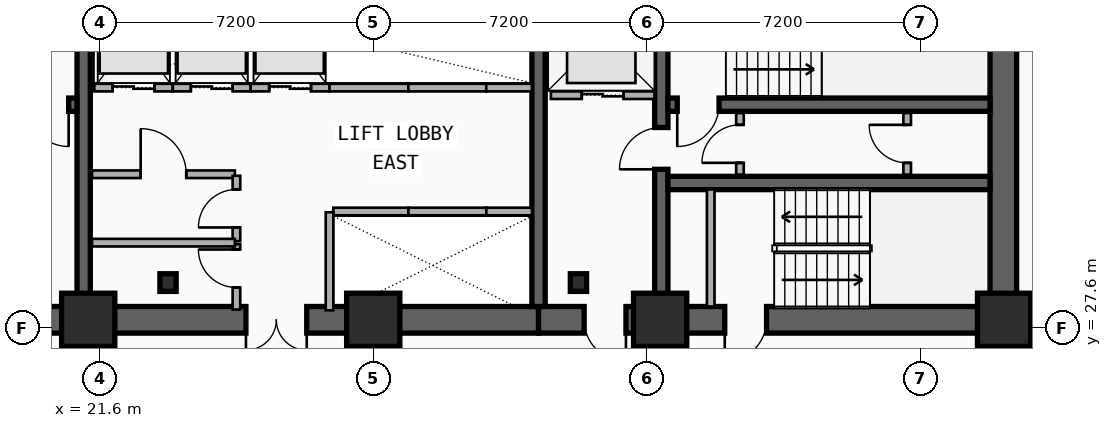
"""IFC4 building model, lengths in metres.
Left out: names, types, materials, properties, quantities, classifications, styles, units other than length and angle.
Written with IfcOpenShell. Run it as: python <this file> out.ifc"""

import sys

from ifc_helpers import new_model, si_unit, direction, frame, frame_2d, origin, origin_2d, place, context, subcontext, project, spatial, rectangle, i_section, extrude, element, fill, save


model = new_model("IFC4")
c1 = context("Model", 3, precision=1e-05, world=origin(), true_north=direction((0.0, 1.0)))
c2 = subcontext(c1, "Body", "Model", "MODEL_VIEW")
j1 = project(units=[si_unit("LENGTHUNIT", "METRE"), si_unit("PLANEANGLEUNIT", "RADIAN")], contexts=[c1])
p1 = place(None, origin())
s1 = spatial("IfcSite", under=j1, at=p1, CompositionType="ELEMENT")
p2 = place(p1, origin())
s2 = spatial("IfcBuilding", under=s1, at=p2, CompositionType="ELEMENT")
p3 = place(p2, frame((0.0, 0.0, 36.0)))
s3 = spatial("IfcBuildingStorey", under=s2, at=p3, CompositionType="ELEMENT", Elevation=36.0)
p4 = place(p3, frame((21.18, 27.82, 0.0), z_axis=(0.0, 0.0, 1.0), x_axis=(-1.0, 0.0, 0.0)))
e1 = element("IfcWall", 1, at=p4, inside=s3, PredefinedType="SHEAR", context=c2, shape_type="SweptSolid", body=[
    extrude(rectangle(XDim=9.03, YDim=0.7, at=frame_2d((4.515, 0.0))), origin(), (0.0, 0.0, 1.0), 3.5),
])
p5 = place(p4, frame((2.68, 0.0, 0.0)))
e2 = element("IfcOpeningElement", 2, at=p5, cuts=e1, PredefinedType="OPENING", context=c2, shape_type="SweptSolid", body=[
    extrude(rectangle(XDim=1.1, YDim=2.15, at=frame_2d((0.55, 1.075))), frame((0.0, 0.36, 0.0), z_axis=(0.0, -1.0, 0.0), x_axis=(1.0, 0.0, 0.0)), (0.0, 0.0, 1.0), 0.72),
])
p6 = place(p3, frame((33.15, 27.82, 0.0), z_axis=(0.0, 0.0, 1.0), x_axis=(-1.0, 0.0, 0.0)))
e3 = element("IfcWall", 3, at=p6, inside=s3, PredefinedType="SHEAR", context=c2, shape_type="SweptSolid", body=[
    extrude(rectangle(XDim=11.97, YDim=0.7, at=frame_2d((5.985, 0.0))), origin(), (0.0, 0.0, 1.0), 3.5),
])
p7 = place(p6, frame((6.1, 0.0, 0.0)))
e4 = element("IfcOpeningElement", 4, at=p7, cuts=e3, PredefinedType="OPENING", context=c2, shape_type="SweptSolid", body=[
    extrude(rectangle(XDim=1.6, YDim=2.2, at=frame_2d((0.8, 1.1))), frame((0.0, 0.36, 0.0), z_axis=(0.0, -1.0, 0.0), x_axis=(1.0, 0.0, 0.0)), (0.0, 0.0, 1.0), 0.72),
])
p8 = place(p3, frame((45.38, 27.82, 0.0), z_axis=(0.0, 0.0, 1.0), x_axis=(-1.0, 0.0, 0.0)))
e5 = element("IfcWall", 5, at=p8, inside=s3, PredefinedType="SHEAR", context=c2, shape_type="SweptSolid", body=[
    extrude(rectangle(XDim=12.23, YDim=0.7, at=frame_2d((6.115, 0.0))), origin(), (0.0, 0.0, 1.0), 3.5),
])
p9 = place(p8, frame((9.93, 0.0, 0.0)))
e6 = element("IfcOpeningElement", 6, at=p9, cuts=e5, PredefinedType="OPENING", context=c2, shape_type="SweptSolid", body=[
    extrude(rectangle(XDim=1.1, YDim=2.15, at=frame_2d((0.55, 1.075))), frame((0.0, 0.36, 0.0), z_axis=(0.0, -1.0, 0.0), x_axis=(1.0, 0.0, 0.0)), (0.0, 0.0, 1.0), 0.72),
])
p10 = place(p8, frame((6.23, 0.0, 0.0)))
e7 = element("IfcOpeningElement", 7, at=p10, cuts=e5, PredefinedType="OPENING", context=c2, shape_type="SweptSolid", body=[
    extrude(rectangle(XDim=1.1, YDim=2.15, at=frame_2d((0.55, 1.075))), frame((0.0, 0.36, 0.0), z_axis=(0.0, -1.0, 0.0), x_axis=(1.0, 0.0, 0.0)), (0.0, 0.0, 1.0), 0.72),
])
p11 = place(p3, frame((45.38, 28.17, 0.0), z_axis=(0.0, 0.0, 1.0), x_axis=(0.0, 1.0, 0.0)))
e8 = element("IfcWall", 8, at=p11, inside=s3, PredefinedType="SHEAR", context=c2, shape_type="SweptSolid", body=[
    extrude(rectangle(XDim=8.53, YDim=0.7, at=frame_2d((4.265, 0.0))), origin(), (0.0, 0.0, 1.0), 3.5),
])
for number, where, z_axis, x_axis in (
    (9, (21.18, 28.17, 0.0), (0.0, 0.0, 1.0), (0.0, 1.0, 0.0)),
    (10, (33.15, 28.17, 0.0), (0.0, 0.0, 1.0), (0.0, 1.0, 0.0)),
):
    element("IfcWall", number, at=place(p3, frame(where, z_axis=z_axis, x_axis=x_axis)), inside=s3, PredefinedType="SHEAR", context=c2, shape_type="SweptSolid", body=[
        extrude(rectangle(XDim=8.53, YDim=0.35, at=frame_2d((4.265, 0.0))), origin(), (0.0, 0.0, 1.0), 3.5),
    ])
p12 = place(p3, frame((36.38, 28.17, 0.0), z_axis=(0.0, 0.0, 1.0), x_axis=(0.0, 1.0, 0.0)))
e11 = element("IfcWall", 11, at=p12, inside=s3, PredefinedType="SHEAR", context=c2, shape_type="SweptSolid", body=[
    extrude(rectangle(XDim=8.53, YDim=0.35, at=frame_2d((4.265, 0.0))), origin(), (0.0, 0.0, 1.0), 3.5),
])
p13 = place(p12, frame((3.61, 0.0, 0.0)))
e12 = element("IfcOpeningElement", 12, at=p13, cuts=e11, PredefinedType="OPENING", context=c2, shape_type="SweptSolid", body=[
    extrude(rectangle(XDim=1.1, YDim=2.15, at=frame_2d((0.55, 1.075))), frame((0.0, 0.185, 0.0), z_axis=(0.0, -1.0, 0.0), x_axis=(1.0, 0.0, 0.0)), (0.0, 0.0, 1.0), 0.37),
])
p14 = place(p3, frame((21.005, 33.48, 0.0), z_axis=(0.0, 0.0, 1.0), x_axis=(-1.0, 0.0, 0.0)))
e13 = element("IfcWall", 13, at=p14, inside=s3, PredefinedType="SHEAR", context=c2, shape_type="SweptSolid", body=[
    extrude(rectangle(XDim=8.505, YDim=0.35, at=frame_2d((4.252, 0.0))), origin(), (0.0, 0.0, 1.0), 3.5),
])
p15 = place(p14, frame((0.22, 0.0, 0.0)))
e14 = element("IfcOpeningElement", 14, at=p15, cuts=e13, PredefinedType="OPENING", context=c2, shape_type="SweptSolid", body=[
    extrude(rectangle(XDim=1.1, YDim=2.15, at=frame_2d((0.55, 1.075))), frame((0.0, 0.185, 0.0), z_axis=(0.0, -1.0, 0.0), x_axis=(1.0, 0.0, 0.0)), (0.0, 0.0, 1.0), 0.37),
])
p16 = place(p3, frame((45.03, 33.48, 0.0), z_axis=(0.0, 0.0, 1.0), x_axis=(-1.0, 0.0, 0.0)))
e15 = element("IfcWall", 15, at=p16, inside=s3, PredefinedType="SHEAR", context=c2, shape_type="SweptSolid", body=[
    extrude(rectangle(XDim=8.475, YDim=0.35, at=frame_2d((4.238, 0.0))), origin(), (0.0, 0.0, 1.0), 3.5),
])
p17 = place(p16, frame((7.13, 0.0, 0.0)))
e16 = element("IfcOpeningElement", 16, at=p17, cuts=e15, PredefinedType="OPENING", context=c2, shape_type="SweptSolid", body=[
    extrude(rectangle(XDim=1.1, YDim=2.15, at=frame_2d((0.55, 1.075))), frame((0.0, 0.185, 0.0), z_axis=(0.0, -1.0, 0.0), x_axis=(1.0, 0.0, 0.0)), (0.0, 0.0, 1.0), 0.37),
])
p18 = place(p3, frame((36.555, 31.42, 0.0), z_axis=(0.0, 0.0, 1.0), x_axis=(1.0, 0.0, 0.0)))
e17 = element("IfcWall", 17, at=p18, inside=s3, PredefinedType="SHEAR", context=c2, shape_type="SweptSolid", body=[
    extrude(rectangle(XDim=8.475, YDim=0.35, at=frame_2d((4.238, 0.0))), origin(), (0.0, 0.0, 1.0), 3.5),
])
for number, where, z_axis, x_axis in (
    (18, (23.4, 28.8, 0.0), (0.0, 0.0, 1.0), (1.0, 0.0, 0.0)),
    (19, (34.2, 28.8, 0.0), (0.0, 0.0, 1.0), (1.0, 0.0, 0.0)),
):
    element("IfcColumn", number, at=place(p3, frame(where, z_axis=z_axis, x_axis=x_axis)), inside=s3, PredefinedType="COLUMN", context=c2, shape_type="SweptSolid", body=[
        extrude(i_section(OverallWidth=0.428, OverallDepth=0.465, WebThickness=0.045, FlangeThickness=0.073, FilletRadius=0.015, at=origin_2d()), origin(), (0.0, 0.0, 1.0), 3.5),
    ])
for number, where, z_axis, x_axis in (
    (20, (21.3, 27.82, 0.0), (0.0, 0.0, 1.0), (1.0, 0.0, 0.0)),
    (21, (28.8, 27.82, 0.0), (0.0, 0.0, 1.0), (1.0, 0.0, 0.0)),
    (22, (36.35, 27.82, 0.0), (0.0, 0.0, 1.0), (1.0, 0.0, 0.0)),
    (23, (45.4, 27.82, 0.0), (0.0, 0.0, 1.0), (1.0, 0.0, 0.0)),
):
    element("IfcColumn", number, at=place(p3, frame(where, z_axis=z_axis, x_axis=x_axis)), inside=s3, PredefinedType="COLUMN", context=c2, shape_type="SweptSolid", body=[
        extrude(rectangle(XDim=1.4, YDim=1.4, at=origin_2d()), origin(), (0.0, 0.0, 1.0), 3.5),
    ])
p19 = place(p3, frame((33.475, 33.73, 0.0), z_axis=(0.0, 0.0, 1.0), x_axis=(1.0, 0.0, 0.0)))
e24 = element("IfcWall", 24, at=p19, inside=s3, PredefinedType="PARTITIONING", context=c2, shape_type="SweptSolid", body=[
    extrude(rectangle(XDim=2.725, YDim=0.2, at=frame_2d((1.362, 0.0))), origin(), (0.0, 0.0, 1.0), 2.212),
])
p20 = place(p19, frame((0.812, 0.0, 0.0)))
e25 = element("IfcOpeningElement", 25, at=p20, cuts=e24, PredefinedType="OPENING", context=c2, shape_type="SweptSolid", body=[
    extrude(rectangle(XDim=1.1, YDim=2.15, at=frame_2d((0.55, 1.075))), frame((0.0, 0.11, 0.0), z_axis=(0.0, -1.0, 0.0), x_axis=(1.0, 0.0, 0.0)), (0.0, 0.0, 1.0), 0.22),
])
p21 = place(p3, frame((27.75, 30.67, 0.0), z_axis=(0.0, 0.0, 1.0), x_axis=(1.0, 0.0, 0.0)))
e26 = element("IfcWall", 26, at=p21, inside=s3, PredefinedType="PARTITIONING", context=c2, shape_type="SweptSolid", body=[
    extrude(rectangle(XDim=1.975, YDim=0.2, at=frame_2d((0.988, 0.0))), origin(), (0.0, 0.0, 1.0), 2.212),
])
p22 = place(p3, frame((27.65, 28.07, 0.0), z_axis=(0.0, 0.0, 1.0), x_axis=(0.0, 1.0, 0.0)))
e27 = element("IfcWall", 27, at=p22, inside=s3, PredefinedType="PARTITIONING", context=c2, shape_type="SweptSolid", body=[
    extrude(rectangle(XDim=2.58, YDim=0.2, at=frame_2d((1.29, 0.0))), origin(), (0.0, 0.0, 1.0), 2.212),
])
p23 = place(p3, frame((29.725, 30.67, 0.0), z_axis=(0.0, 0.0, 1.0), x_axis=(1.0, 0.0, 0.0)))
e28 = element("IfcWall", 28, at=p23, inside=s3, PredefinedType="PARTITIONING", context=c2, shape_type="SweptSolid", body=[
    extrude(rectangle(XDim=2.05, YDim=0.2, at=frame_2d((1.025, 0.0))), origin(), (0.0, 0.0, 1.0), 2.62),
])
p24 = place(p3, frame((31.775, 30.67, 0.0), z_axis=(0.0, 0.0, 1.0), x_axis=(1.0, 0.0, 0.0)))
e29 = element("IfcWall", 29, at=p24, inside=s3, PredefinedType="PARTITIONING", context=c2, shape_type="SweptSolid", body=[
    extrude(rectangle(XDim=1.2, YDim=0.2, at=frame_2d((0.6, 0.0))), origin(), (0.0, 0.0, 1.0), 2.62),
])
p25 = place(p3, frame((21.46, 33.93, 0.0), z_axis=(0.0, 0.0, 1.0), x_axis=(1.0, 0.0, 0.0)))
e30 = element("IfcWall", 30, at=p25, inside=s3, PredefinedType="PARTITIONING", context=c2, shape_type="SweptSolid", body=[
    extrude(rectangle(XDim=2.065, YDim=0.2, at=frame_2d((1.032, 0.0))), origin(), (0.0, 0.0, 1.0), 2.212),
])
p26 = place(p25, frame((0.482, 0.0, 0.0)))
e31 = element("IfcOpeningElement", 31, at=p26, cuts=e30, PredefinedType="OPENING", context=c2, shape_type="SweptSolid", body=[
    extrude(rectangle(XDim=1.1, YDim=2.15, at=frame_2d((0.55, 1.075))), frame((0.0, 0.11, 0.0), z_axis=(0.0, -1.0, 0.0), x_axis=(1.0, 0.0, 0.0)), (0.0, 0.0, 1.0), 0.22),
])
p27 = place(p3, frame((23.525, 33.93, 0.0), z_axis=(0.0, 0.0, 1.0), x_axis=(1.0, 0.0, 0.0)))
e32 = element("IfcWall", 32, at=p27, inside=s3, PredefinedType="PARTITIONING", context=c2, shape_type="SweptSolid", body=[
    extrude(rectangle(XDim=2.05, YDim=0.2, at=frame_2d((1.025, 0.0))), origin(), (0.0, 0.0, 1.0), 3.24),
])
p28 = place(p27, frame((0.475, 0.0, 0.0)))
e33 = element("IfcOpeningElement", 33, at=p28, cuts=e32, PredefinedType="OPENING", context=c2, shape_type="SweptSolid", body=[
    extrude(rectangle(XDim=1.1, YDim=2.15, at=frame_2d((0.55, 1.075))), frame((0.0, 0.11, 0.0), z_axis=(0.0, -1.0, 0.0), x_axis=(1.0, 0.0, 0.0)), (0.0, 0.0, 1.0), 0.22),
])
p29 = place(p3, frame((25.575, 33.93, 0.0), z_axis=(0.0, 0.0, 1.0), x_axis=(1.0, 0.0, 0.0)))
e34 = element("IfcWall", 34, at=p29, inside=s3, PredefinedType="PARTITIONING", context=c2, shape_type="SweptSolid", body=[
    extrude(rectangle(XDim=2.075, YDim=0.2, at=frame_2d((1.038, 0.0))), origin(), (0.0, 0.0, 1.0), 3.24),
])
p30 = place(p29, frame((0.488, 0.0, 0.0)))
e35 = element("IfcOpeningElement", 35, at=p30, cuts=e34, PredefinedType="OPENING", context=c2, shape_type="SweptSolid", body=[
    extrude(rectangle(XDim=1.1, YDim=2.15, at=frame_2d((0.55, 1.075))), frame((0.0, 0.11, 0.0), z_axis=(0.0, -1.0, 0.0), x_axis=(1.0, 0.0, 0.0)), (0.0, 0.0, 1.0), 0.22),
])
p31 = place(p3, frame((27.65, 33.93, 0.0), z_axis=(0.0, 0.0, 1.0), x_axis=(1.0, 0.0, 0.0)))
e36 = element("IfcWall", 36, at=p31, inside=s3, PredefinedType="PARTITIONING", context=c2, shape_type="SweptSolid", body=[
    extrude(rectangle(XDim=2.075, YDim=0.2, at=frame_2d((1.038, 0.0))), origin(), (0.0, 0.0, 1.0), 2.212),
])
p32 = place(p3, frame((29.725, 33.93, 0.0), z_axis=(0.0, 0.0, 1.0), x_axis=(1.0, 0.0, 0.0)))
e37 = element("IfcWall", 37, at=p32, inside=s3, PredefinedType="PARTITIONING", context=c2, shape_type="SweptSolid", body=[
    extrude(rectangle(XDim=2.05, YDim=0.2, at=frame_2d((1.025, 0.0))), origin(), (0.0, 0.0, 1.0), 3.24),
])
p33 = place(p3, frame((31.775, 33.93, 0.0), z_axis=(0.0, 0.0, 1.0), x_axis=(1.0, 0.0, 0.0)))
e38 = element("IfcWall", 38, at=p33, inside=s3, PredefinedType="PARTITIONING", context=c2, shape_type="SweptSolid", body=[
    extrude(rectangle(XDim=1.2, YDim=0.2, at=frame_2d((0.6, 0.0))), origin(), (0.0, 0.0, 1.0), 3.24),
])
p34 = place(p3, frame((37.68, 28.17, 0.0), z_axis=(0.0, 0.0, 1.0), x_axis=(0.0, 1.0, 0.0)))
e39 = element("IfcWall", 39, at=p34, inside=s3, PredefinedType="PARTITIONING", context=c2, shape_type="SweptSolid", body=[
    extrude(rectangle(XDim=3.08, YDim=0.2, at=frame_2d((1.54, 0.0))), origin(), (0.0, 0.0, 1.0), 2.62),
])
p35 = place(p3, frame((38.45, 31.64, 0.0), z_axis=(0.0, 0.0, 1.0), x_axis=(0.0, 1.0, 0.0)))
e40 = element("IfcWall", 40, at=p35, inside=s3, PredefinedType="PARTITIONING", context=c2, shape_type="SweptSolid", body=[
    extrude(rectangle(XDim=1.62, YDim=0.2, at=frame_2d((0.81, 0.0))), origin(), (0.0, 0.0, 1.0), 3.24),
])
p36 = place(p35, frame((0.31, 0.0, 0.0)))
e41 = element("IfcOpeningElement", 41, at=p36, cuts=e40, PredefinedType="OPENING", context=c2, shape_type="SweptSolid", body=[
    extrude(rectangle(XDim=1.0, YDim=2.15, at=frame_2d((0.5, 1.075))), frame((0.0, 0.11, 0.0), z_axis=(0.0, -1.0, 0.0), x_axis=(1.0, 0.0, 0.0)), (0.0, 0.0, 1.0), 0.22),
])
p37 = place(p3, frame((42.85, 31.64, 0.0), z_axis=(0.0, 0.0, 1.0), x_axis=(0.0, 1.0, 0.0)))
e42 = element("IfcWall", 42, at=p37, inside=s3, PredefinedType="PARTITIONING", context=c2, shape_type="SweptSolid", body=[
    extrude(rectangle(XDim=1.62, YDim=0.2, at=frame_2d((0.81, 0.0))), origin(), (0.0, 0.0, 1.0), 3.24),
])
p38 = place(p37, frame((0.31, 0.0, 0.0)))
e43 = element("IfcOpeningElement", 43, at=p38, cuts=e42, PredefinedType="OPENING", context=c2, shape_type="SweptSolid", body=[
    extrude(rectangle(XDim=1.0, YDim=2.15, at=frame_2d((0.5, 1.075))), frame((0.0, 0.11, 0.0), z_axis=(0.0, -1.0, 0.0), x_axis=(1.0, 0.0, 0.0)), (0.0, 0.0, 1.0), 0.22),
])
p39 = place(p3, frame((21.4, 31.65, 0.0), z_axis=(0.0, 0.0, 1.0), x_axis=(1.0, 0.0, 0.0)))
e44 = element("IfcWall", 44, at=p39, inside=s3, PredefinedType="PARTITIONING", context=c2, shape_type="SweptSolid", body=[
    extrude(rectangle(XDim=3.76, YDim=0.2, at=frame_2d((1.88, 0.0))), origin(), (0.0, 0.0, 1.0), 2.28),
])
p40 = place(p39, frame((1.28, 0.0, 0.0)))
e45 = element("IfcOpeningElement", 45, at=p40, cuts=e44, PredefinedType="OPENING", context=c2, shape_type="SweptSolid", body=[
    extrude(rectangle(XDim=1.2, YDim=2.15, at=frame_2d((0.6, 1.075))), frame((0.0, 0.11, 0.0), z_axis=(0.0, -1.0, 0.0), x_axis=(1.0, 0.0, 0.0)), (0.0, 0.0, 1.0), 0.22),
])
p41 = place(p3, frame((25.2, 28.09, 0.0), z_axis=(0.0, 0.0, 1.0), x_axis=(0.0, 1.0, 0.0)))
e46 = element("IfcWall", 46, at=p41, inside=s3, PredefinedType="PARTITIONING", context=c2, shape_type="SweptSolid", body=[
    extrude(rectangle(XDim=1.72, YDim=0.2, at=frame_2d((0.86, 0.0))), origin(), (0.0, 0.0, 1.0), 2.62),
])
p42 = place(p41, frame((0.58, 0.0, 0.0)))
e47 = element("IfcOpeningElement", 47, at=p42, cuts=e46, PredefinedType="OPENING", context=c2, shape_type="SweptSolid", body=[
    extrude(rectangle(XDim=1.0, YDim=2.15, at=frame_2d((0.5, 1.075))), frame((0.0, 0.11, 0.0), z_axis=(0.0, -1.0, 0.0), x_axis=(1.0, 0.0, 0.0)), (0.0, 0.0, 1.0), 0.22),
])
p43 = place(p3, frame((25.2, 29.89, 0.0), z_axis=(0.0, 0.0, 1.0), x_axis=(0.0, 1.0, 0.0)))
e48 = element("IfcWall", 48, at=p43, inside=s3, PredefinedType="PARTITIONING", context=c2, shape_type="SweptSolid", body=[
    extrude(rectangle(XDim=1.72, YDim=0.2, at=frame_2d((0.86, 0.0))), origin(), (0.0, 0.0, 1.0), 3.24),
])
p44 = place(p43, frame((0.36, 0.0, 0.0)))
e49 = element("IfcOpeningElement", 49, at=p44, cuts=e48, PredefinedType="OPENING", context=c2, shape_type="SweptSolid", body=[
    extrude(rectangle(XDim=1.0, YDim=2.15, at=frame_2d((0.5, 1.075))), frame((0.0, 0.11, 0.0), z_axis=(0.0, -1.0, 0.0), x_axis=(1.0, 0.0, 0.0)), (0.0, 0.0, 1.0), 0.22),
])
p45 = place(p3, frame((21.4, 29.85, 0.0), z_axis=(0.0, 0.0, 1.0), x_axis=(1.0, 0.0, 0.0)))
e50 = element("IfcWall", 50, at=p45, inside=s3, PredefinedType="PARTITIONING", context=c2, shape_type="SweptSolid", body=[
    extrude(rectangle(XDim=3.76, YDim=0.2, at=frame_2d((1.88, 0.0))), origin(), (0.0, 0.0, 1.0), 2.28),
])
p46 = place(p3, frame((45.41, 27.6, 0.0), z_axis=(0.0, 0.0, 1.0), x_axis=(1.0, 0.0, 0.0)))
e51 = element("IfcWall", 51, at=p46, inside=s3, PredefinedType="PARTITIONING", context=c2, shape_type="SweptSolid", body=[
    extrude(rectangle(XDim=0.91, YDim=0.16, at=frame_2d((0.455, 0.0))), origin(), (0.0, 0.0, 1.0), 2.28),
])
p47 = place(p20, origin())
e52 = element("IfcDoor", 52, at=p47, inside=s3, OperationType="DOUBLE_DOOR_SLIDING", PredefinedType="DOOR", context=c2, shape_type="SweptSolid", body=[
    extrude(rectangle(XDim=1.1, YDim=2.15, at=frame_2d((0.55, 1.075))), frame((0.0, 0.025, 0.0), z_axis=(0.0, -1.0, 0.0), x_axis=(1.0, 0.0, 0.0)), (0.0, 0.0, 1.0), 0.05),
])
fill(e25, e52)
p48 = place(p26, origin())
e53 = element("IfcDoor", 53, at=p48, inside=s3, OperationType="DOUBLE_DOOR_SLIDING", PredefinedType="DOOR", context=c2, shape_type="SweptSolid", body=[
    extrude(rectangle(XDim=1.1, YDim=2.15, at=frame_2d((0.55, 1.075))), frame((0.0, 0.025, 0.0), z_axis=(0.0, -1.0, 0.0), x_axis=(1.0, 0.0, 0.0)), (0.0, 0.0, 1.0), 0.05),
])
fill(e31, e53)
p49 = place(p28, origin())
e54 = element("IfcDoor", 54, at=p49, inside=s3, OperationType="DOUBLE_DOOR_SLIDING", PredefinedType="DOOR", context=c2, shape_type="SweptSolid", body=[
    extrude(rectangle(XDim=1.1, YDim=2.15, at=frame_2d((0.55, 1.075))), frame((0.0, 0.025, 0.0), z_axis=(0.0, -1.0, 0.0), x_axis=(1.0, 0.0, 0.0)), (0.0, 0.0, 1.0), 0.05),
])
fill(e33, e54)
p50 = place(p30, origin())
e55 = element("IfcDoor", 55, at=p50, inside=s3, OperationType="DOUBLE_DOOR_SLIDING", PredefinedType="DOOR", context=c2, shape_type="SweptSolid", body=[
    extrude(rectangle(XDim=1.1, YDim=2.15, at=frame_2d((0.55, 1.075))), frame((0.0, 0.025, 0.0), z_axis=(0.0, -1.0, 0.0), x_axis=(1.0, 0.0, 0.0)), (0.0, 0.0, 1.0), 0.05),
])
fill(e35, e55)
p51 = place(p15, origin())
e56 = element("IfcDoor", 56, at=p51, inside=s3, OperationType="SINGLE_SWING_LEFT", PredefinedType="DOOR", context=c2, shape_type="SweptSolid", body=[
    extrude(rectangle(XDim=1.1, YDim=2.15, at=frame_2d((0.55, 1.075))), frame((0.0, 0.025, 0.0), z_axis=(0.0, -1.0, 0.0), x_axis=(1.0, 0.0, 0.0)), (0.0, 0.0, 1.0), 0.05),
])
fill(e14, e56)
p52 = place(p17, origin())
e57 = element("IfcDoor", 57, at=p52, inside=s3, OperationType="SINGLE_SWING_RIGHT", PredefinedType="DOOR", context=c2, shape_type="SweptSolid", body=[
    extrude(rectangle(XDim=1.1, YDim=2.15, at=frame_2d((0.55, 1.075))), frame((0.0, 0.025, 0.0), z_axis=(0.0, -1.0, 0.0), x_axis=(1.0, 0.0, 0.0)), (0.0, 0.0, 1.0), 0.05),
])
fill(e16, e57)
p53 = place(p13, origin())
e58 = element("IfcDoor", 58, at=p53, inside=s3, OperationType="SINGLE_SWING_LEFT", PredefinedType="DOOR", context=c2, shape_type="SweptSolid", body=[
    extrude(rectangle(XDim=1.1, YDim=2.15, at=frame_2d((0.55, 1.075))), frame((0.0, 0.025, 0.0), z_axis=(0.0, -1.0, 0.0), x_axis=(1.0, 0.0, 0.0)), (0.0, 0.0, 1.0), 0.05),
])
fill(e12, e58)
p54 = place(p9, origin())
e59 = element("IfcDoor", 59, at=p54, inside=s3, OperationType="SINGLE_SWING_LEFT", PredefinedType="DOOR", context=c2, shape_type="SweptSolid", body=[
    extrude(rectangle(XDim=1.1, YDim=2.15, at=frame_2d((0.55, 1.075))), frame((0.0, 0.025, 0.0), z_axis=(0.0, -1.0, 0.0), x_axis=(1.0, 0.0, 0.0)), (0.0, 0.0, 1.0), 0.05),
])
fill(e6, e59)
p55 = place(p10, origin())
e60 = element("IfcDoor", 60, at=p55, inside=s3, OperationType="SINGLE_SWING_RIGHT", PredefinedType="DOOR", context=c2, shape_type="SweptSolid", body=[
    extrude(rectangle(XDim=1.1, YDim=2.15, at=frame_2d((0.55, 1.075))), frame((0.0, 0.025, 0.0), z_axis=(0.0, -1.0, 0.0), x_axis=(1.0, 0.0, 0.0)), (0.0, 0.0, 1.0), 0.05),
])
fill(e7, e60)
p56 = place(p7, origin())
e61 = element("IfcDoor", 61, at=p56, inside=s3, OperationType="SINGLE_SWING_LEFT", PredefinedType="DOOR", context=c2, shape_type="SweptSolid", body=[
    extrude(rectangle(XDim=1.6, YDim=2.2, at=frame_2d((0.8, 1.1))), frame((0.0, 0.025, 0.0), z_axis=(0.0, -1.0, 0.0), x_axis=(1.0, 0.0, 0.0)), (0.0, 0.0, 1.0), 0.05),
])
fill(e4, e61)
p57 = place(p36, origin())
e62 = element("IfcDoor", 62, at=p57, inside=s3, OperationType="SINGLE_SWING_LEFT", PredefinedType="DOOR", context=c2, shape_type="SweptSolid", body=[
    extrude(rectangle(XDim=1.0, YDim=2.15, at=frame_2d((0.5, 1.075))), frame((0.0, 0.025, 0.0), z_axis=(0.0, -1.0, 0.0), x_axis=(1.0, 0.0, 0.0)), (0.0, 0.0, 1.0), 0.05),
])
fill(e41, e62)
p58 = place(p38, origin())
e63 = element("IfcDoor", 63, at=p58, inside=s3, OperationType="SINGLE_SWING_RIGHT", PredefinedType="DOOR", context=c2, shape_type="SweptSolid", body=[
    extrude(rectangle(XDim=1.0, YDim=2.15, at=frame_2d((0.5, 1.075))), frame((0.0, 0.025, 0.0), z_axis=(0.0, -1.0, 0.0), x_axis=(1.0, 0.0, 0.0)), (0.0, 0.0, 1.0), 0.05),
])
fill(e43, e63)
p59 = place(p40, origin())
e64 = element("IfcDoor", 64, at=p59, inside=s3, OperationType="SINGLE_SWING_LEFT", PredefinedType="DOOR", context=c2, shape_type="SweptSolid", body=[
    extrude(rectangle(XDim=1.2, YDim=2.15, at=frame_2d((0.6, 1.075))), frame((0.0, 0.025, 0.0), z_axis=(0.0, -1.0, 0.0), x_axis=(1.0, 0.0, 0.0)), (0.0, 0.0, 1.0), 0.05),
])
fill(e45, e64)
p60 = place(p42, origin())
e65 = element("IfcDoor", 65, at=p60, inside=s3, OperationType="SINGLE_SWING_RIGHT", PredefinedType="DOOR", context=c2, shape_type="SweptSolid", body=[
    extrude(rectangle(XDim=1.0, YDim=2.15, at=frame_2d((0.5, 1.075))), frame((0.0, 0.025, 0.0), z_axis=(0.0, -1.0, 0.0), x_axis=(1.0, 0.0, 0.0)), (0.0, 0.0, 1.0), 0.05),
])
fill(e47, e65)
p61 = place(p44, origin())
e66 = element("IfcDoor", 66, at=p61, inside=s3, OperationType="SINGLE_SWING_LEFT", PredefinedType="DOOR", context=c2, shape_type="SweptSolid", body=[
    extrude(rectangle(XDim=1.0, YDim=2.15, at=frame_2d((0.5, 1.075))), frame((0.0, 0.025, 0.0), z_axis=(0.0, -1.0, 0.0), x_axis=(1.0, 0.0, 0.0)), (0.0, 0.0, 1.0), 0.05),
])
fill(e49, e66)
save(model, sys.argv[1])
